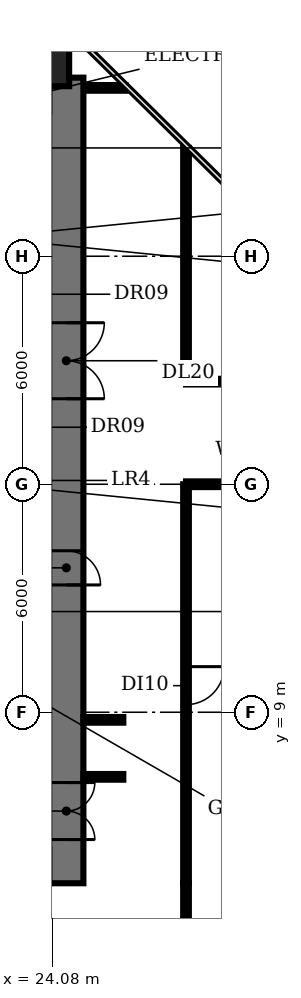
"""IFC4 building model, lengths in metres.
Left out: names, types, materials, properties, quantities, classifications, styles, units other than length and angle.
Written with IfcOpenShell. Run it as: python <this file> out.ifc"""

import sys

from ifc_helpers import new_model, si_unit, direction, frame, frame_2d, origin, origin_2d, place, context, subcontext, project, spatial, rectangle, circle, extrude, element, fill, save


model = new_model("IFC4")
c1 = context("Model", 3, precision=1e-05, world=origin(), true_north=direction((0.0, 1.0)))
c2 = subcontext(c1, "Body", "Model", "MODEL_VIEW")
j1 = project(units=[si_unit("LENGTHUNIT", "METRE"), si_unit("PLANEANGLEUNIT", "RADIAN")], contexts=[c1])
p1 = place(None, origin())
s1 = spatial("IfcSite", under=j1, at=p1, CompositionType="ELEMENT")
p2 = place(p1, origin())
s2 = spatial("IfcBuilding", under=s1, at=p2, CompositionType="ELEMENT")
p3 = place(p2, frame((0.0, 0.0, 54.2)))
s3 = spatial("IfcBuildingStorey", under=s2, at=p3, CompositionType="ELEMENT", Elevation=54.2)
p4 = place(p3, frame((24.0, 26.0, 0.0), z_axis=(0.0, 0.0, 1.0), x_axis=(1.0, 0.0, 0.0)))
e1 = element("IfcColumn", 1, at=p4, inside=s3, PredefinedType="COLUMN", context=c2, shape_type="SweptSolid", body=[
    extrude(circle(Radius=0.525, at=origin_2d()), origin(), (0.0, 0.0, 1.0), 3.85),
])
p5 = place(p3, frame((24.45, 25.7, 0.0), z_axis=(0.0, 0.0, 1.0), x_axis=(0.0, -1.0, 0.0)))
e2 = element("IfcWall", 2, at=p5, inside=s3, PredefinedType="SHEAR", context=c2, shape_type="SweptSolid", body=[
    extrude(rectangle(XDim=21.2, YDim=0.9, at=frame_2d((10.6, 0.0))), origin(), (0.0, 0.0, 1.0), 3.85),
])
p6 = place(p5, frame((18.55, 0.0, 0.0)))
e3 = element("IfcOpeningElement", 3, at=p6, cuts=e2, PredefinedType="OPENING", context=c2, shape_type="SweptSolid", body=[
    extrude(rectangle(XDim=1.5, YDim=2.1, at=frame_2d((0.75, 1.05))), frame((0.0, 0.46, 0.0), z_axis=(0.0, -1.0, 0.0), x_axis=(1.0, 0.0, 0.0)), (0.0, 0.0, 1.0), 0.92),
])
p7 = place(p5, frame((12.45, 0.0, 0.0)))
e4 = element("IfcOpeningElement", 4, at=p7, cuts=e2, PredefinedType="OPENING", context=c2, shape_type="SweptSolid", body=[
    extrude(rectangle(XDim=0.9, YDim=2.1, at=frame_2d((0.45, 1.05))), frame((0.0, 0.46, 0.0), z_axis=(0.0, -1.0, 0.0), x_axis=(1.0, 0.0, 0.0)), (0.0, 0.0, 1.0), 0.92),
])
p8 = place(p5, frame((6.45, 0.0, 0.0)))
e5 = element("IfcOpeningElement", 5, at=p8, cuts=e2, PredefinedType="OPENING", context=c2, shape_type="SweptSolid", body=[
    extrude(rectangle(XDim=2.0, YDim=2.1, at=frame_2d((1.0, 1.05))), frame((0.0, 0.46, 0.0), z_axis=(0.0, -1.0, 0.0), x_axis=(1.0, 0.0, 0.0)), (0.0, 0.0, 1.0), 0.92),
])
for number, where, z_axis, x_axis in (
    (6, (24.9, 7.3, 0.0), (0.0, 0.0, 1.0), (1.0, 0.0, 0.0)),
    (7, (24.9, 8.8, 0.0), (0.0, 0.0, 1.0), (1.0, 0.0, 0.0)),
):
    element("IfcWall", number, at=place(p3, frame(where, z_axis=z_axis, x_axis=x_axis)), inside=s3, PredefinedType="PARTITIONING", context=c2, shape_type="SweptSolid", body=[
        extrude(rectangle(XDim=1.05, YDim=0.15, at=frame_2d((0.525, 0.0))), origin(), (0.0, 0.0, 1.0), 2.83),
    ])
p9 = place(p3, frame((25.0, 25.43, 0.0), z_axis=(0.0, 0.0, 1.0), x_axis=(1.0, 0.0, 0.0)))
e8 = element("IfcWall", 8, at=p9, inside=s3, PredefinedType="PARTITIONING", context=c2, shape_type="SweptSolid", body=[
    extrude(rectangle(XDim=1.01, YDim=0.15, at=frame_2d((0.505, 0.0))), origin(), (0.0, 0.0, 1.0), 2.83),
])
p10 = place(p3, frame((27.6, 0.6, 0.0), z_axis=(0.0, 0.0, 1.0), x_axis=(0.0, 1.0, 0.0)))
e9 = element("IfcWall", 9, at=p10, inside=s3, PredefinedType="PARTITIONING", context=c2, shape_type="SweptSolid", body=[
    extrude(rectangle(XDim=3.9, YDim=0.15, at=frame_2d((1.95, 0.0))), origin(), (0.0, 0.0, 1.0), 2.83),
])
p11 = place(p3, frame((27.6, 15.0, 0.0), z_axis=(0.0, 0.0, 1.0), x_axis=(0.0, -1.0, 0.0)))
e10 = element("IfcWall", 10, at=p11, inside=s3, PredefinedType="PARTITIONING", context=c2, shape_type="SweptSolid", body=[
    extrude(rectangle(XDim=10.5, YDim=0.15, at=frame_2d((5.25, 0.0))), origin(), (0.0, 0.0, 1.0), 2.83),
])
p12 = place(p11, frame((4.8, 0.0, 0.0)))
e11 = element("IfcOpeningElement", 11, at=p12, cuts=e10, PredefinedType="OPENING", context=c2, shape_type="SweptSolid", body=[
    extrude(rectangle(XDim=1.0, YDim=2.1, at=frame_2d((0.5, 1.05))), frame((0.0, 0.085, 0.0), z_axis=(0.0, -1.0, 0.0), x_axis=(1.0, 0.0, 0.0)), (0.0, 0.0, 1.0), 0.17),
])
p13 = place(p3, frame((27.6, 15.0, 0.0), z_axis=(0.0, 0.0, 1.0), x_axis=(1.0, 0.0, 0.0)))
e12 = element("IfcWall", 12, at=p13, inside=s3, PredefinedType="PARTITIONING", context=c2, shape_type="SweptSolid", body=[
    extrude(rectangle(XDim=8.4, YDim=0.15, at=frame_2d((4.2, 0.0))), origin(), (0.0, 0.0, 1.0), 2.83),
])
p14 = place(p3, frame((27.6, 17.7, 0.0), z_axis=(0.0, 0.0, 1.0), x_axis=(0.0, 1.0, 0.0)))
e13 = element("IfcWall", 13, at=p14, inside=s3, PredefinedType="PARTITIONING", context=c2, shape_type="SweptSolid", body=[
    extrude(rectangle(XDim=6.15, YDim=0.15, at=frame_2d((3.075, 0.0))), origin(), (0.0, 0.0, 1.0), 2.83),
])
p15 = place(p3, frame((27.6, 17.7, 0.0), z_axis=(0.0, 0.0, 1.0), x_axis=(1.0, 0.0, 0.0)))
e14 = element("IfcWall", 14, at=p15, inside=s3, PredefinedType="PARTITIONING", context=c2, shape_type="SweptSolid", body=[
    extrude(rectangle(XDim=8.4, YDim=0.15, at=frame_2d((4.2, 0.0))), origin(), (0.0, 0.0, 1.0), 2.83),
])
p16 = place(p15, frame((3.9, 0.0, 0.0)))
e15 = element("IfcOpeningElement", 15, at=p16, cuts=e14, PredefinedType="OPENING", context=c2, shape_type="SweptSolid", body=[
    extrude(rectangle(XDim=1.0, YDim=2.1, at=frame_2d((0.5, 1.05))), frame((0.0, 0.085, 0.0), z_axis=(0.0, -1.0, 0.0), x_axis=(1.0, 0.0, 0.0)), (0.0, 0.0, 1.0), 0.17),
])
p17 = place(p6, origin())
e16 = element("IfcDoor", 16, at=p17, inside=s3, OperationType="DOUBLE_DOOR_SINGLE_SWING", PredefinedType="DOOR", context=c2, shape_type="SweptSolid", body=[
    extrude(rectangle(XDim=1.5, YDim=2.1, at=frame_2d((0.75, 1.05))), frame((0.0, 0.025, 0.0), z_axis=(0.0, -1.0, 0.0), x_axis=(1.0, 0.0, 0.0)), (0.0, 0.0, 1.0), 0.05),
])
fill(e3, e16)
p18 = place(p8, origin())
e17 = element("IfcDoor", 17, at=p18, inside=s3, OperationType="DOUBLE_DOOR_SINGLE_SWING", PredefinedType="DOOR", context=c2, shape_type="SweptSolid", body=[
    extrude(rectangle(XDim=2.0, YDim=2.1, at=frame_2d((1.0, 1.05))), frame((0.0, 0.025, 0.0), z_axis=(0.0, -1.0, 0.0), x_axis=(1.0, 0.0, 0.0)), (0.0, 0.0, 1.0), 0.05),
])
fill(e5, e17)
p19 = place(p12, origin())
e18 = element("IfcDoor", 18, at=p19, inside=s3, OperationType="SINGLE_SWING_LEFT", PredefinedType="DOOR", context=c2, shape_type="SweptSolid", body=[
    extrude(rectangle(XDim=1.0, YDim=2.1, at=frame_2d((0.5, 1.05))), frame((0.0, 0.025, 0.0), z_axis=(0.0, -1.0, 0.0), x_axis=(1.0, 0.0, 0.0)), (0.0, 0.0, 1.0), 0.05),
])
fill(e11, e18)
save(model, sys.argv[1])
